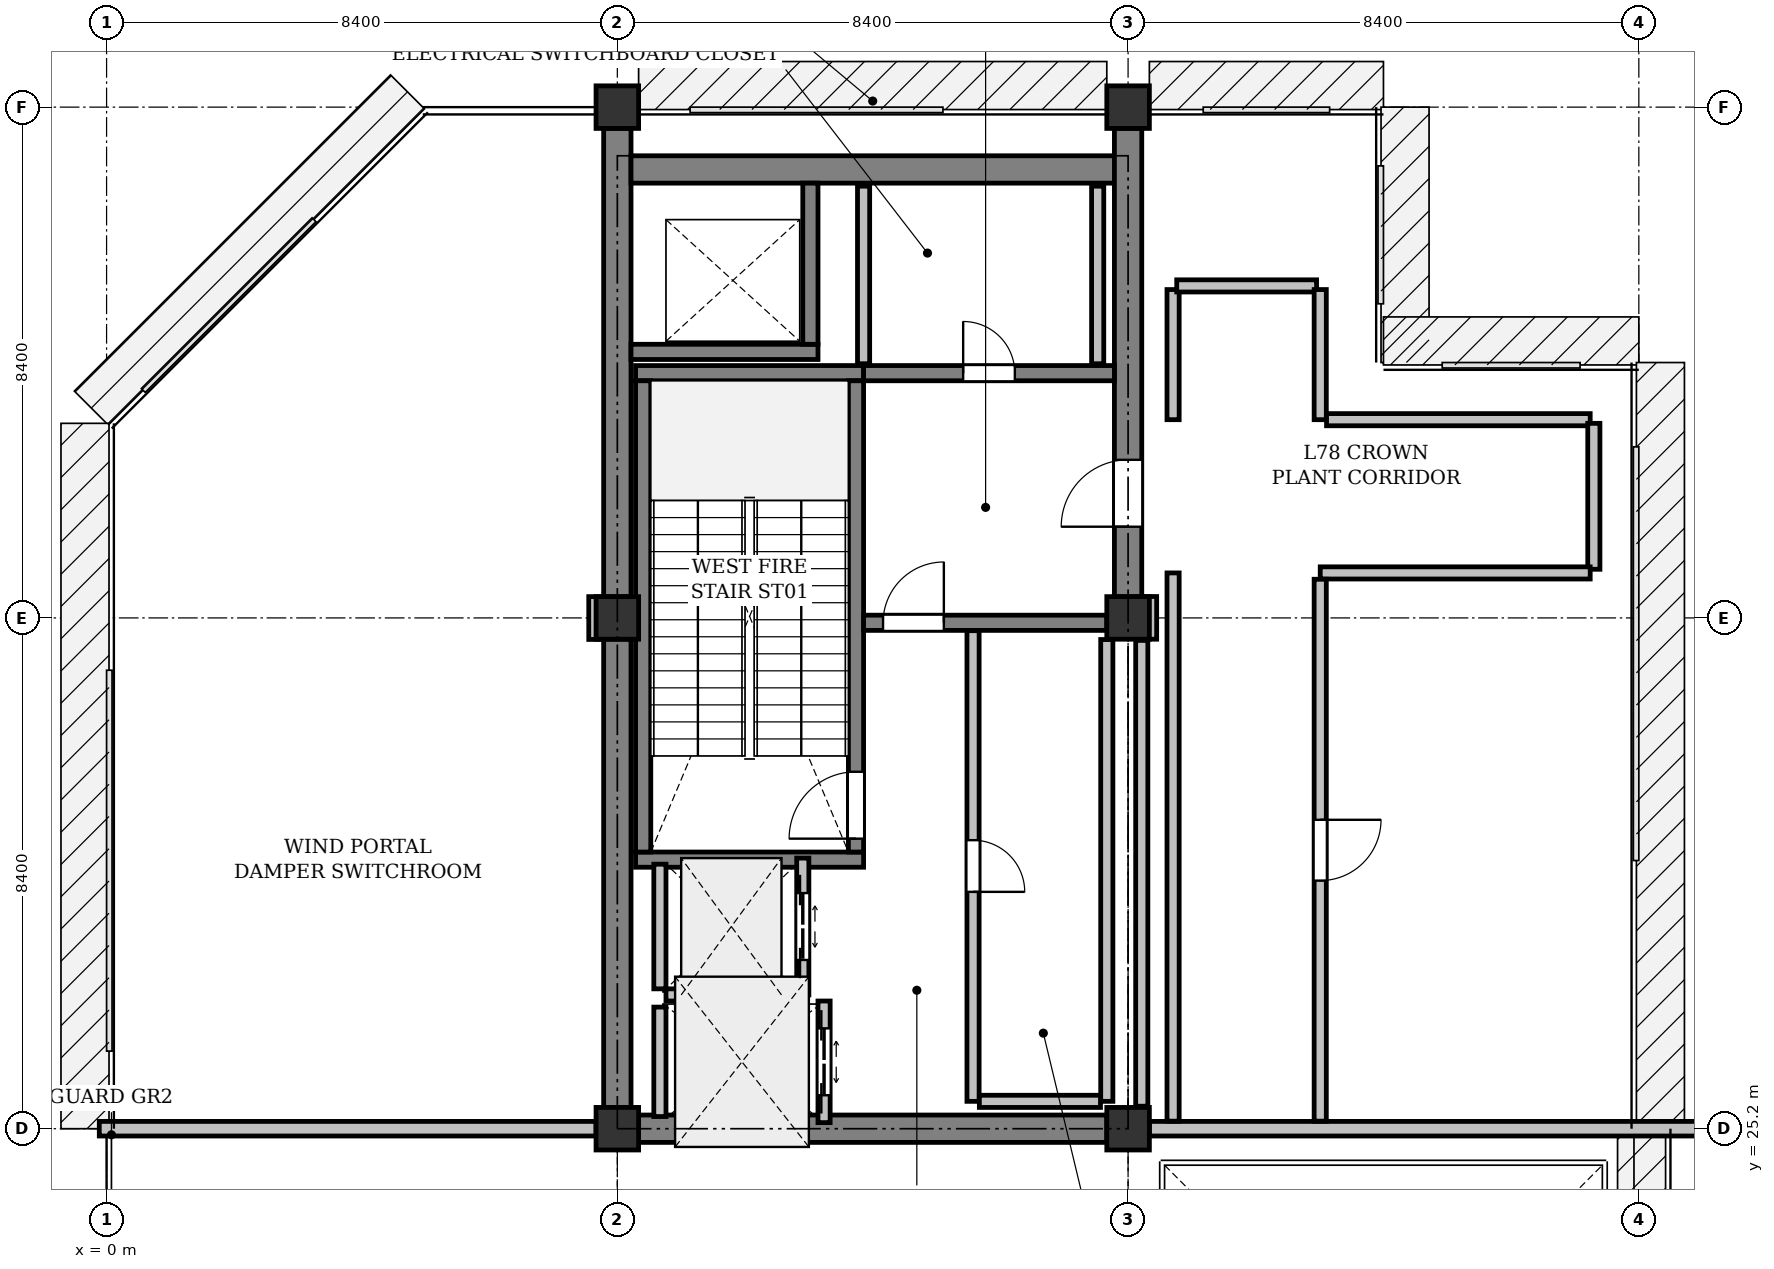
"""IFC4 building model, lengths in metres.
Left out: names, types, materials, properties, quantities, classifications, styles, units other than length and angle.
Written with IfcOpenShell. Run it as: python <this file> out.ifc"""

import sys

from ifc_helpers import new_model, si_unit, direction, frame, frame_2d, origin, origin_2d, place, context, subcontext, project, spatial, rectangle, extrude, element, fill, save


model = new_model("IFC4")
c1 = context("Model", 3, precision=1e-05, world=origin(), true_north=direction((0.0, 1.0)))
c2 = subcontext(c1, "Body", "Model", "MODEL_VIEW")
j1 = project(units=[si_unit("LENGTHUNIT", "METRE"), si_unit("PLANEANGLEUNIT", "RADIAN")], contexts=[c1])
p1 = place(None, origin())
s1 = spatial("IfcSite", under=j1, at=p1, CompositionType="ELEMENT")
p2 = place(p1, origin())
s2 = spatial("IfcBuilding", under=s1, at=p2, CompositionType="ELEMENT")
p3 = place(p2, frame((0.0, 0.0, 327.0)))
s3 = spatial("IfcBuildingStorey", under=s2, at=p3, CompositionType="ELEMENT", Elevation=327.0)
for number, where, z_axis, x_axis in (
    (1, (8.4, 25.2, 0.0), (0.0, 0.0, 1.0), (1.0, 0.0, 0.0)),
    (2, (8.4, 33.6, 0.0), (0.0, 0.0, 1.0), (1.0, 0.0, 0.0)),
    (3, (8.4, 42.0, 0.0), (0.0, 0.0, 1.0), (1.0, 0.0, 0.0)),
    (4, (16.8, 25.2, 0.0), (0.0, 0.0, 1.0), (1.0, 0.0, 0.0)),
    (5, (16.8, 33.6, 0.0), (0.0, 0.0, 1.0), (1.0, 0.0, 0.0)),
    (6, (16.8, 42.0, 0.0), (0.0, 0.0, 1.0), (1.0, 0.0, 0.0)),
):
    element("IfcColumn", number, at=place(p3, frame(where, z_axis=z_axis, x_axis=x_axis)), inside=s3, PredefinedType="COLUMN", context=c2, shape_type="SweptSolid", body=[
        extrude(rectangle(XDim=0.7, YDim=0.7, at=origin_2d()), origin(), (0.0, 0.0, 1.0), 5.725),
    ])
p4 = place(p3, frame((17.15, 25.2, 0.0), z_axis=(0.0, 0.0, 1.0), x_axis=(1.0, 0.0, 0.0)))
e7 = element("IfcWall", 7, at=p4, inside=s3, PredefinedType="STANDARD", context=c2, shape_type="SweptSolid", body=[
    extrude(rectangle(XDim=16.57, YDim=0.24, at=frame_2d((8.285, 0.0))), origin(), (0.0, 0.0, 1.0), 5.725),
])
p5 = place(p3, frame((8.05, 25.2, 0.0), z_axis=(0.0, 0.0, 1.0), x_axis=(-1.0, 0.0, 0.0)))
e8 = element("IfcWall", 8, at=p5, inside=s3, PredefinedType="STANDARD", context=c2, shape_type="SweptSolid", body=[
    extrude(rectangle(XDim=8.17, YDim=0.24, at=frame_2d((4.085, 0.0))), origin(), (0.0, 0.0, 1.0), 5.725),
])
for number, where, z_axis, x_axis in (
    (9, (8.4, 25.55, 0.0), (0.0, 0.0, 1.0), (0.0, 1.0, 0.0)),
    (10, (8.4, 33.95, 0.0), (0.0, 0.0, 1.0), (0.0, 1.0, 0.0)),
):
    element("IfcWall", number, at=place(p3, frame(where, z_axis=z_axis, x_axis=x_axis)), inside=s3, PredefinedType="SHEAR", context=c2, shape_type="SweptSolid", body=[
        extrude(rectangle(XDim=7.7, YDim=0.45, at=frame_2d((3.85, 0.0))), origin(), (0.0, 0.0, 1.0), 5.725),
    ])
p6 = place(p3, frame((8.625, 40.975, 0.0), z_axis=(0.0, 0.0, 1.0), x_axis=(1.0, 0.0, 0.0)))
e11 = element("IfcWall", 11, at=p6, inside=s3, PredefinedType="SHEAR", context=c2, shape_type="SweptSolid", body=[
    extrude(rectangle(XDim=7.95, YDim=0.45, at=frame_2d((3.975, 0.0))), origin(), (0.0, 0.0, 1.0), 5.725),
])
p7 = place(p3, frame((16.8, 33.95, 0.0), z_axis=(0.0, 0.0, 1.0), x_axis=(0.0, 1.0, 0.0)))
e12 = element("IfcWall", 12, at=p7, inside=s3, PredefinedType="SHEAR", context=c2, shape_type="SweptSolid", body=[
    extrude(rectangle(XDim=7.7, YDim=0.45, at=frame_2d((3.85, 0.0))), origin(), (0.0, 0.0, 1.0), 5.725),
])
p8 = place(p7, frame((1.15, 0.0, 0.0)))
e13 = element("IfcOpeningElement", 13, at=p8, cuts=e12, PredefinedType="OPENING", context=c2, shape_type="SweptSolid", body=[
    extrude(rectangle(XDim=1.1, YDim=2.15, at=frame_2d((0.55, 1.075))), frame((0.0, 0.235, 0.0), z_axis=(0.0, -1.0, 0.0), x_axis=(1.0, 0.0, 0.0)), (0.0, 0.0, 1.0), 0.47),
])
p9 = place(p3, frame((8.75, 25.2, 0.0), z_axis=(0.0, 0.0, 1.0), x_axis=(1.0, 0.0, 0.0)))
e14 = element("IfcWall", 14, at=p9, inside=s3, PredefinedType="SHEAR", context=c2, shape_type="SweptSolid", body=[
    extrude(rectangle(XDim=7.7, YDim=0.45, at=frame_2d((3.85, 0.0))), origin(), (0.0, 0.0, 1.0), 5.725),
])
for number, where, z_axis, x_axis in (
    (15, (12.45, 29.625, 0.0), (0.0, 0.0, 1.0), (-1.0, 0.0, 0.0)),
    (16, (12.45, 37.625, 0.0), (0.0, 0.0, 1.0), (-1.0, 0.0, 0.0)),
):
    element("IfcWall", number, at=place(p3, frame(where, z_axis=z_axis, x_axis=x_axis)), inside=s3, PredefinedType="SHEAR", context=c2, shape_type="SweptSolid", body=[
        extrude(rectangle(XDim=3.75, YDim=0.25, at=frame_2d((1.875, 0.0))), origin(), (0.0, 0.0, 1.0), 5.725),
    ])
p10 = place(p3, frame((12.325, 29.75, 0.0), z_axis=(0.0, 0.0, 1.0), x_axis=(0.0, 1.0, 0.0)))
e17 = element("IfcWall", 17, at=p10, inside=s3, PredefinedType="SHEAR", context=c2, shape_type="SweptSolid", body=[
    extrude(rectangle(XDim=7.75, YDim=0.25, at=frame_2d((3.875, 0.0))), origin(), (0.0, 0.0, 1.0), 5.725),
])
p11 = place(p10, frame((0.22, 0.0, 0.0)))
e18 = element("IfcOpeningElement", 18, at=p11, cuts=e17, PredefinedType="OPENING", context=c2, shape_type="SweptSolid", body=[
    extrude(rectangle(XDim=1.1, YDim=2.15, at=frame_2d((0.55, 1.075))), frame((0.0, 0.135, 0.0), z_axis=(0.0, -1.0, 0.0), x_axis=(1.0, 0.0, 0.0)), (0.0, 0.0, 1.0), 0.27),
])
p12 = place(p3, frame((8.825, 29.75, 0.0), z_axis=(0.0, 0.0, 1.0), x_axis=(0.0, 1.0, 0.0)))
e19 = element("IfcWall", 19, at=p12, inside=s3, PredefinedType="SHEAR", context=c2, shape_type="SweptSolid", body=[
    extrude(rectangle(XDim=7.75, YDim=0.25, at=frame_2d((3.875, 0.0))), origin(), (0.0, 0.0, 1.0), 5.725),
])
p13 = place(p3, frame((8.625, 37.975, 0.0), z_axis=(0.0, 0.0, 1.0), x_axis=(1.0, 0.0, 0.0)))
e20 = element("IfcWall", 20, at=p13, inside=s3, PredefinedType="SHEAR", context=c2, shape_type="SweptSolid", body=[
    extrude(rectangle(XDim=3.075, YDim=0.25, at=frame_2d((1.538, 0.0))), origin(), (0.0, 0.0, 1.0), 5.725),
])
p14 = place(p3, frame((11.575, 38.1, 0.0), z_axis=(0.0, 0.0, 1.0), x_axis=(0.0, 1.0, 0.0)))
e21 = element("IfcWall", 21, at=p14, inside=s3, PredefinedType="SHEAR", context=c2, shape_type="SweptSolid", body=[
    extrude(rectangle(XDim=2.65, YDim=0.25, at=frame_2d((1.325, 0.0))), origin(), (0.0, 0.0, 1.0), 5.725),
])
p15 = place(p3, frame((12.45, 33.52, 0.0), z_axis=(0.0, 0.0, 1.0), x_axis=(1.0, 0.0, 0.0)))
e22 = element("IfcWall", 22, at=p15, inside=s3, PredefinedType="SHEAR", context=c2, shape_type="SweptSolid", body=[
    extrude(rectangle(XDim=4.0, YDim=0.25, at=frame_2d((2.0, 0.0))), origin(), (0.0, 0.0, 1.0), 5.725),
])
p16 = place(p15, frame((0.32, 0.0, 0.0)))
e23 = element("IfcOpeningElement", 23, at=p16, cuts=e22, PredefinedType="OPENING", context=c2, shape_type="SweptSolid", body=[
    extrude(rectangle(XDim=1.0, YDim=2.15, at=frame_2d((0.5, 1.075))), frame((0.0, 0.135, 0.0), z_axis=(0.0, -1.0, 0.0), x_axis=(1.0, 0.0, 0.0)), (0.0, 0.0, 1.0), 0.27),
])
p17 = place(p3, frame((12.45, 37.625, 0.0), z_axis=(0.0, 0.0, 1.0), x_axis=(1.0, 0.0, 0.0)))
e24 = element("IfcWall", 24, at=p17, inside=s3, PredefinedType="SHEAR", context=c2, shape_type="SweptSolid", body=[
    extrude(rectangle(XDim=4.125, YDim=0.25, at=frame_2d((2.062, 0.0))), origin(), (0.0, 0.0, 1.0), 5.725),
])
p18 = place(p17, frame((1.637, 0.0, 0.0)))
e25 = element("IfcOpeningElement", 25, at=p18, cuts=e24, PredefinedType="OPENING", context=c2, shape_type="SweptSolid", body=[
    extrude(rectangle(XDim=0.85, YDim=2.15, at=frame_2d((0.425, 1.075))), frame((0.0, 0.135, 0.0), z_axis=(0.0, -1.0, 0.0), x_axis=(1.0, 0.0, 0.0)), (0.0, 0.0, 1.0), 0.27),
])
p19 = place(p3, frame((11.45, 27.4, 0.0), z_axis=(0.0, 0.0, 1.0), x_axis=(0.0, 1.0, 0.0)))
e26 = element("IfcWall", 26, at=p19, inside=s3, PredefinedType="PARTITIONING", context=c2, shape_type="SweptSolid", body=[
    extrude(rectangle(XDim=2.25, YDim=0.2, at=frame_2d((1.125, 0.0))), origin(), (0.0, 0.0, 1.0), 5.725),
])
p20 = place(p19, frame((0.575, 0.0, 0.0)))
e27 = element("IfcOpeningElement", 27, at=p20, cuts=e26, PredefinedType="OPENING", context=c2, shape_type="SweptSolid", body=[
    extrude(rectangle(XDim=1.1, YDim=2.2, at=frame_2d((0.55, 1.1))), frame((0.0, 0.11, 0.0), z_axis=(0.0, -1.0, 0.0), x_axis=(1.0, 0.0, 0.0)), (0.0, 0.0, 1.0), 0.22),
])
p21 = place(p3, frame((9.1, 27.5, 0.0), z_axis=(0.0, 0.0, 1.0), x_axis=(0.0, 1.0, 0.0)))
e28 = element("IfcWall", 28, at=p21, inside=s3, PredefinedType="PARTITIONING", context=c2, shape_type="SweptSolid", body=[
    extrude(rectangle(XDim=2.05, YDim=0.2, at=frame_2d((1.025, 0.0))), origin(), (0.0, 0.0, 1.0), 5.725),
])
p22 = place(p3, frame((9.2, 27.4, 0.0), z_axis=(0.0, 0.0, 1.0), x_axis=(1.0, 0.0, 0.0)))
e29 = element("IfcWall", 29, at=p22, inside=s3, PredefinedType="PARTITIONING", context=c2, shape_type="SweptSolid", body=[
    extrude(rectangle(XDim=2.15, YDim=0.2, at=frame_2d((1.075, 0.0))), origin(), (0.0, 0.0, 1.0), 5.725),
])
p23 = place(p3, frame((11.8, 25.3, 0.0), z_axis=(0.0, 0.0, 1.0), x_axis=(0.0, 1.0, 0.0)))
e30 = element("IfcWall", 30, at=p23, inside=s3, PredefinedType="PARTITIONING", context=c2, shape_type="SweptSolid", body=[
    extrude(rectangle(XDim=2.0, YDim=0.2, at=frame_2d((1.0, 0.0))), origin(), (0.0, 0.0, 1.0), 5.725),
])
p24 = place(p23, frame((0.45, 0.0, 0.0)))
e31 = element("IfcOpeningElement", 31, at=p24, cuts=e30, PredefinedType="OPENING", context=c2, shape_type="SweptSolid", body=[
    extrude(rectangle(XDim=1.1, YDim=2.2, at=frame_2d((0.55, 1.1))), frame((0.0, 0.11, 0.0), z_axis=(0.0, -1.0, 0.0), x_axis=(1.0, 0.0, 0.0)), (0.0, 0.0, 1.0), 0.22),
])
p25 = place(p3, frame((9.1, 25.4, 0.0), z_axis=(0.0, 0.0, 1.0), x_axis=(0.0, 1.0, 0.0)))
e32 = element("IfcWall", 32, at=p25, inside=s3, PredefinedType="PARTITIONING", context=c2, shape_type="SweptSolid", body=[
    extrude(rectangle(XDim=1.8, YDim=0.2, at=frame_2d((0.9, 0.0))), origin(), (0.0, 0.0, 1.0), 5.725),
])
p26 = place(p3, frame((16.45, 25.65, 0.0), z_axis=(0.0, 0.0, 1.0), x_axis=(0.0, 1.0, 0.0)))
e33 = element("IfcWall", 33, at=p26, inside=s3, PredefinedType="PARTITIONING", context=c2, shape_type="SweptSolid", body=[
    extrude(rectangle(XDim=7.595, YDim=0.2, at=frame_2d((3.798, 0.0))), origin(), (0.0, 0.0, 1.0), 5.725),
])
p27 = place(p3, frame((14.25, 33.39, 0.0), z_axis=(0.0, 0.0, 1.0), x_axis=(0.0, -1.0, 0.0)))
e34 = element("IfcWall", 34, at=p27, inside=s3, PredefinedType="PARTITIONING", context=c2, shape_type="SweptSolid", body=[
    extrude(rectangle(XDim=7.74, YDim=0.2, at=frame_2d((3.87, 0.0))), origin(), (0.0, 0.0, 1.0), 5.725),
])
p28 = place(p27, frame((3.445, 0.0, 0.0)))
e35 = element("IfcOpeningElement", 35, at=p28, cuts=e34, PredefinedType="OPENING", context=c2, shape_type="SweptSolid", body=[
    extrude(rectangle(XDim=0.85, YDim=2.15, at=frame_2d((0.425, 1.075))), frame((0.0, 0.11, 0.0), z_axis=(0.0, -1.0, 0.0), x_axis=(1.0, 0.0, 0.0)), (0.0, 0.0, 1.0), 0.22),
])
p29 = place(p3, frame((14.354, 25.65, 0.0), z_axis=(0.0, 0.0, 1.0), x_axis=(1.0, 0.0, 0.0)))
e36 = element("IfcWall", 36, at=p29, inside=s3, PredefinedType="PARTITIONING", context=c2, shape_type="SweptSolid", body=[
    extrude(rectangle(XDim=1.992, YDim=0.2, at=frame_2d((0.996, 0.0))), origin(), (0.0, 0.0, 1.0), 5.725),
])
for number, where, z_axis, x_axis in (
    (37, (16.3, 37.78, 0.0), (0.0, 0.0, 1.0), (0.0, 1.0, 0.0)),
    (38, (12.45, 40.7, 0.0), (0.0, 0.0, 1.0), (0.0, -1.0, 0.0)),
):
    element("IfcWall", number, at=place(p3, frame(where, z_axis=z_axis, x_axis=x_axis)), inside=s3, PredefinedType="PARTITIONING", context=c2, shape_type="SweptSolid", body=[
        extrude(rectangle(XDim=2.92, YDim=0.2, at=frame_2d((1.46, 0.0))), origin(), (0.0, 0.0, 1.0), 5.725),
    ])
p30 = place(p3, frame((8.031, 33.246, 0.0), z_axis=(0.0, 0.0, 1.0), x_axis=(-0.000693721651, 0.999999759375, 0.0)))
e39 = element("IfcWall", 39, at=p30, inside=s3, PredefinedType="PARTITIONING", context=c2, shape_type="SweptSolid", body=[
    extrude(rectangle(XDim=0.704, YDim=0.2, at=frame_2d((0.352, 0.0))), origin(), (0.0, 0.0, 1.0), 5.725),
])
p31 = place(p3, frame((17.54, 36.86, 0.0), z_axis=(0.0, 0.0, 1.0), x_axis=(0.0, 1.0, 0.0)))
e40 = element("IfcWall", 40, at=p31, inside=s3, PredefinedType="PARTITIONING", context=c2, shape_type="SweptSolid", body=[
    extrude(rectangle(XDim=2.14, YDim=0.2, at=frame_2d((1.07, 0.0))), origin(), (0.0, 0.0, 1.0), 5.725),
])
p32 = place(p3, frame((17.6, 39.06, 0.0), z_axis=(0.0, 0.0, 1.0), x_axis=(1.0, 0.0, 0.0)))
e41 = element("IfcWall", 41, at=p32, inside=s3, PredefinedType="PARTITIONING", context=c2, shape_type="SweptSolid", body=[
    extrude(rectangle(XDim=2.3, YDim=0.2, at=frame_2d((1.15, 0.0))), origin(), (0.0, 0.0, 1.0), 5.725),
])
p33 = place(p3, frame((19.96, 39.0, 0.0), z_axis=(0.0, 0.0, 1.0), x_axis=(0.0, -1.0, 0.0)))
e42 = element("IfcWall", 42, at=p33, inside=s3, PredefinedType="PARTITIONING", context=c2, shape_type="SweptSolid", body=[
    extrude(rectangle(XDim=2.14, YDim=0.2, at=frame_2d((1.07, 0.0))), origin(), (0.0, 0.0, 1.0), 5.725),
])
p34 = place(p3, frame((20.064, 36.86, 0.0), z_axis=(0.0, 0.0, 1.0), x_axis=(1.0, 0.0, 0.0)))
e43 = element("IfcWall", 43, at=p34, inside=s3, PredefinedType="PARTITIONING", context=c2, shape_type="SweptSolid", body=[
    extrude(rectangle(XDim=4.336, YDim=0.2, at=frame_2d((2.168, 0.0))), origin(), (0.0, 0.0, 1.0), 5.725),
])
p35 = place(p3, frame((24.46, 36.8, 0.0), z_axis=(0.0, 0.0, 1.0), x_axis=(0.0, -1.0, 0.0)))
e44 = element("IfcWall", 44, at=p35, inside=s3, PredefinedType="PARTITIONING", context=c2, shape_type="SweptSolid", body=[
    extrude(rectangle(XDim=2.4, YDim=0.2, at=frame_2d((1.2, 0.0))), origin(), (0.0, 0.0, 1.0), 5.725),
])
p36 = place(p3, frame((24.4, 34.34, 0.0), z_axis=(0.0, 0.0, 1.0), x_axis=(-1.0, 0.0, 0.0)))
e45 = element("IfcWall", 45, at=p36, inside=s3, PredefinedType="PARTITIONING", context=c2, shape_type="SweptSolid", body=[
    extrude(rectangle(XDim=4.44, YDim=0.2, at=frame_2d((2.22, 0.0))), origin(), (0.0, 0.0, 1.0), 5.725),
])
p37 = place(p3, frame((19.96, 34.236, 0.0), z_axis=(0.0, 0.0, 1.0), x_axis=(0.0, -1.0, 0.0)))
e46 = element("IfcWall", 46, at=p37, inside=s3, PredefinedType="PARTITIONING", context=c2, shape_type="SweptSolid", body=[
    extrude(rectangle(XDim=8.912, YDim=0.2, at=frame_2d((4.456, 0.0))), origin(), (0.0, 0.0, 1.0), 5.725),
])
p38 = place(p37, frame((3.956, 0.0, 0.0)))
e47 = element("IfcOpeningElement", 47, at=p38, cuts=e46, PredefinedType="OPENING", context=c2, shape_type="SweptSolid", body=[
    extrude(rectangle(XDim=1.0, YDim=2.15, at=frame_2d((0.5, 1.075))), frame((0.0, 0.11, 0.0), z_axis=(0.0, -1.0, 0.0), x_axis=(1.0, 0.0, 0.0)), (0.0, 0.0, 1.0), 0.22),
])
p39 = place(p3, frame((17.54, 25.324, 0.0), z_axis=(0.0, 0.0, 1.0), x_axis=(0.0, 1.0, 0.0)))
e48 = element("IfcWall", 48, at=p39, inside=s3, PredefinedType="PARTITIONING", context=c2, shape_type="SweptSolid", body=[
    extrude(rectangle(XDim=9.016, YDim=0.2, at=frame_2d((4.508, 0.0))), origin(), (0.0, 0.0, 1.0), 5.725),
])
p40 = place(p3, frame((17.17, 33.952, 0.0), z_axis=(0.0, 0.0, 1.0), x_axis=(0.0, -1.0, 0.0)))
e49 = element("IfcWall", 49, at=p40, inside=s3, PredefinedType="PARTITIONING", context=c2, shape_type="SweptSolid", body=[
    extrude(rectangle(XDim=0.702, YDim=0.2, at=frame_2d((0.351, 0.0))), origin(), (0.0, 0.0, 1.0), 5.725),
])
p41 = place(p3, frame((17.025, 33.23, 0.0), z_axis=(0.0, 0.0, 1.0), x_axis=(0.0, -1.0, 0.0)))
e50 = element("IfcWall", 50, at=p41, inside=s3, PredefinedType="PARTITIONING", context=c2, shape_type="SweptSolid", body=[
    extrude(rectangle(XDim=7.66, YDim=0.2, at=frame_2d((3.83, 0.0))), origin(), (0.0, 0.0, 1.0), 5.418),
])
p42 = place(p8, origin())
e51 = element("IfcDoor", 51, at=p42, inside=s3, OperationType="SINGLE_SWING_LEFT", PredefinedType="DOOR", context=c2, shape_type="SweptSolid", body=[
    extrude(rectangle(XDim=1.1, YDim=2.15, at=frame_2d((0.55, 1.075))), frame((0.0, 0.025, 0.0), z_axis=(0.0, -1.0, 0.0), x_axis=(1.0, 0.0, 0.0)), (0.0, 0.0, 1.0), 0.05),
])
fill(e13, e51)
p43 = place(p11, origin())
e52 = element("IfcDoor", 52, at=p43, inside=s3, OperationType="SINGLE_SWING_LEFT", PredefinedType="DOOR", context=c2, shape_type="SweptSolid", body=[
    extrude(rectangle(XDim=1.1, YDim=2.15, at=frame_2d((0.55, 1.075))), frame((0.0, 0.025, 0.0), z_axis=(0.0, -1.0, 0.0), x_axis=(1.0, 0.0, 0.0)), (0.0, 0.0, 1.0), 0.05),
])
fill(e18, e52)
p44 = place(p16, origin())
e53 = element("IfcDoor", 53, at=p44, inside=s3, OperationType="SINGLE_SWING_RIGHT", PredefinedType="DOOR", context=c2, shape_type="SweptSolid", body=[
    extrude(rectangle(XDim=1.0, YDim=2.15, at=frame_2d((0.5, 1.075))), frame((0.0, 0.025, 0.0), z_axis=(0.0, -1.0, 0.0), x_axis=(1.0, 0.0, 0.0)), (0.0, 0.0, 1.0), 0.05),
])
fill(e23, e53)
p45 = place(p20, origin())
e54 = element("IfcDoor", 54, at=p45, inside=s3, OperationType="DOUBLE_DOOR_SLIDING", PredefinedType="DOOR", context=c2, shape_type="SweptSolid", body=[
    extrude(rectangle(XDim=1.1, YDim=2.2, at=frame_2d((0.55, 1.1))), frame((0.0, 0.025, 0.0), z_axis=(0.0, -1.0, 0.0), x_axis=(1.0, 0.0, 0.0)), (0.0, 0.0, 1.0), 0.05),
])
fill(e27, e54)
p46 = place(p24, origin())
e55 = element("IfcDoor", 55, at=p46, inside=s3, OperationType="DOUBLE_DOOR_SLIDING", PredefinedType="DOOR", context=c2, shape_type="SweptSolid", body=[
    extrude(rectangle(XDim=1.1, YDim=2.2, at=frame_2d((0.55, 1.1))), frame((0.0, 0.025, 0.0), z_axis=(0.0, -1.0, 0.0), x_axis=(1.0, 0.0, 0.0)), (0.0, 0.0, 1.0), 0.05),
])
fill(e31, e55)
p47 = place(p28, origin())
e56 = element("IfcDoor", 56, at=p47, inside=s3, OperationType="SINGLE_SWING_RIGHT", PredefinedType="DOOR", context=c2, shape_type="SweptSolid", body=[
    extrude(rectangle(XDim=0.85, YDim=2.15, at=frame_2d((0.425, 1.075))), frame((0.0, 0.025, 0.0), z_axis=(0.0, -1.0, 0.0), x_axis=(1.0, 0.0, 0.0)), (0.0, 0.0, 1.0), 0.05),
])
fill(e35, e56)
p48 = place(p18, origin())
e57 = element("IfcDoor", 57, at=p48, inside=s3, OperationType="SINGLE_SWING_LEFT", PredefinedType="DOOR", context=c2, shape_type="SweptSolid", body=[
    extrude(rectangle(XDim=0.85, YDim=2.15, at=frame_2d((0.425, 1.075))), frame((0.0, 0.025, 0.0), z_axis=(0.0, -1.0, 0.0), x_axis=(1.0, 0.0, 0.0)), (0.0, 0.0, 1.0), 0.05),
])
fill(e25, e57)
p49 = place(p38, origin())
e58 = element("IfcDoor", 58, at=p49, inside=s3, OperationType="SINGLE_SWING_LEFT", PredefinedType="DOOR", context=c2, shape_type="SweptSolid", body=[
    extrude(rectangle(XDim=1.0, YDim=2.15, at=frame_2d((0.5, 1.075))), frame((0.0, 0.025, 0.0), z_axis=(0.0, -1.0, 0.0), x_axis=(1.0, 0.0, 0.0)), (0.0, 0.0, 1.0), 0.05),
])
fill(e47, e58)
save(model, sys.argv[1])
